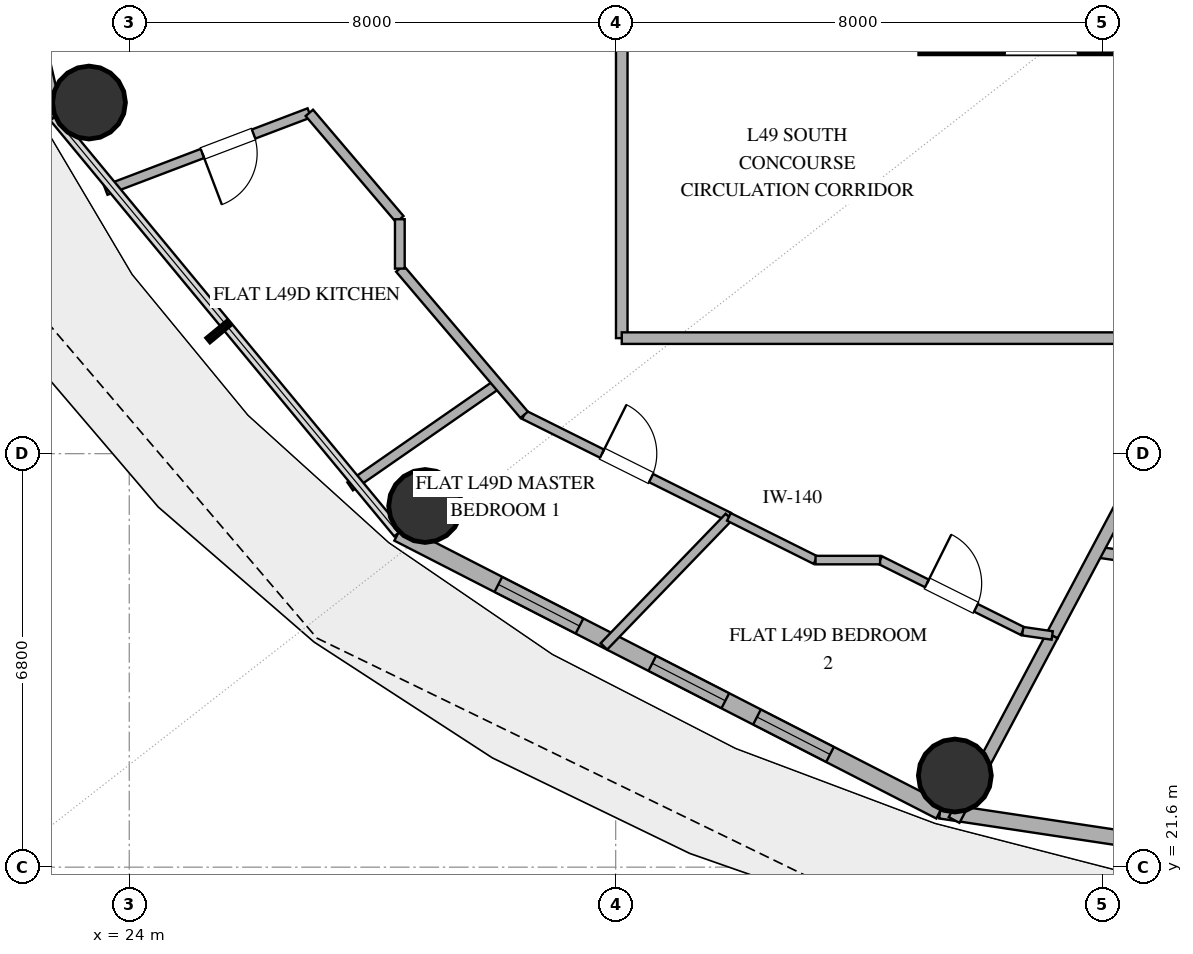
"""IFC4 building model, lengths in metres.
Left out: names, types, materials, properties, quantities, classifications, styles, units other than length and angle.
Written with IfcOpenShell. Run it as: python <this file> out.ifc"""

import sys

from ifc_helpers import new_model, si_unit, direction, frame, frame_2d, origin, origin_2d, place, context, subcontext, project, spatial, rectangle, hollow_circle, extrude, element, fill, save


model = new_model("IFC4")
c1 = context("Model", 3, precision=1e-05, world=origin(), true_north=direction((0.0, 1.0)))
c2 = subcontext(c1, "Body", "Model", "MODEL_VIEW")
j1 = project(units=[si_unit("LENGTHUNIT", "METRE"), si_unit("PLANEANGLEUNIT", "RADIAN")], contexts=[c1])
p1 = place(None, origin())
s1 = spatial("IfcSite", under=j1, at=p1, CompositionType="ELEMENT")
p2 = place(p1, origin())
s2 = spatial("IfcBuilding", under=s1, at=p2, CompositionType="ELEMENT")
p3 = place(p2, frame((0.0, 0.0, 193.8)))
s3 = spatial("IfcBuildingStorey", under=s2, at=p3, CompositionType="ELEMENT", Elevation=193.8)
p4 = place(p3, frame((37.0, 35.2, 0.0), z_axis=(0.0, 0.0, 1.0), x_axis=(1.0, 0.0, 0.0)))
e1 = element("IfcWall", 1, at=p4, inside=s3, PredefinedType="SHEAR", context=c2, shape_type="SweptSolid", body=[
    extrude(rectangle(XDim=4.0, YDim=0.45, at=frame_2d((2.0, 0.0))), origin(), (0.0, 0.0, 1.0), 3.38),
])
p5 = place(p4, frame((1.4, 0.0, 0.0)))
e2 = element("IfcOpeningElement", 2, at=p5, cuts=e1, PredefinedType="OPENING", context=c2, shape_type="SweptSolid", body=[
    extrude(rectangle(XDim=1.2, YDim=2.15, at=frame_2d((0.6, 1.075))), frame((0.0, 0.235, 0.0), z_axis=(0.0, -1.0, 0.0), x_axis=(1.0, 0.0, 0.0)), (0.0, 0.0, 1.0), 0.47),
])
for number, where, z_axis, x_axis in (
    (3, (23.338, 34.174, 0.0), (0.0, 0.0, 1.0), (1.0, 0.0, 0.0)),
    (4, (28.866, 27.54, 0.0), (0.0, 0.0, 1.0), (1.0, 0.0, 0.0)),
    (5, (37.578, 23.107, 0.0), (0.0, 0.0, 1.0), (1.0, 0.0, 0.0)),
):
    element("IfcColumn", number, at=place(p3, frame(where, z_axis=z_axis, x_axis=x_axis)), inside=s3, PredefinedType="COLUMN", context=c2, shape_type="SweptSolid", body=[
        extrude(hollow_circle(Radius=0.6, WallThickness=0.032, at=origin_2d()), origin(), (0.0, 0.0, 1.0), 3.38),
    ])
p6 = place(p3, frame((20.901, 42.0, 0.0), z_axis=(0.0, 0.0, 1.0), x_axis=(0.225473184558, -0.974249374157, 0.0)))
e6 = element("IfcWall", 6, at=p6, inside=s3, PredefinedType="SOLIDWALL", context=c2, shape_type="SweptSolid", body=[
    extrude(rectangle(XDim=8.28, YDim=0.28, at=frame_2d((4.14, 0.0))), origin(), (0.0, 0.0, 1.0), 3.38),
])
p7 = place(p6, frame((5.694, 0.0, 0.0)))
e7 = element("IfcOpeningElement", 7, at=p7, cuts=e6, PredefinedType="OPENING", context=c2, shape_type="SweptSolid", body=[
    extrude(rectangle(XDim=1.05, YDim=2.2, at=frame_2d((0.525, 1.1))), frame((0.0, 0.15, 0.0), z_axis=(0.0, -1.0, 0.0), x_axis=(1.0, 0.0, 0.0)), (0.0, 0.0, 1.0), 0.3),
])
p8 = place(p3, frame((28.424, 27.094, 0.0), z_axis=(0.0, 0.0, 1.0), x_axis=(0.889872523182, -0.456209263919, 0.0)))
e8 = element("IfcWall", 8, at=p8, inside=s3, PredefinedType="SOLIDWALL", context=c2, shape_type="SweptSolid", body=[
    extrude(rectangle(XDim=10.016, YDim=0.28, at=frame_2d((5.008, 0.0))), origin(), (0.0, 0.0, 1.0), 3.38),
])
p9 = place(p8, frame((1.85, 0.0, 0.85)))
e9 = element("IfcOpeningElement", 9, at=p9, cuts=e8, PredefinedType="OPENING", context=c2, shape_type="SweptSolid", body=[
    extrude(rectangle(XDim=1.5, YDim=1.8, at=frame_2d((0.75, 0.9))), frame((0.0, 0.15, 0.0), z_axis=(0.0, -1.0, 0.0), x_axis=(1.0, 0.0, 0.0)), (0.0, 0.0, 1.0), 0.3),
])
p10 = place(p8, frame((4.695, 0.0, 0.85)))
e10 = element("IfcOpeningElement", 10, at=p10, cuts=e8, PredefinedType="OPENING", context=c2, shape_type="SweptSolid", body=[
    extrude(rectangle(XDim=1.35, YDim=1.8, at=frame_2d((0.675, 0.9))), frame((0.0, 0.15, 0.0), z_axis=(0.0, -1.0, 0.0), x_axis=(1.0, 0.0, 0.0)), (0.0, 0.0, 1.0), 0.3),
])
p11 = place(p8, frame((6.63, 0.0, 0.85)))
e11 = element("IfcOpeningElement", 11, at=p11, cuts=e8, PredefinedType="OPENING", context=c2, shape_type="SweptSolid", body=[
    extrude(rectangle(XDim=1.35, YDim=1.8, at=frame_2d((0.675, 0.9))), frame((0.0, 0.15, 0.0), z_axis=(0.0, -1.0, 0.0), x_axis=(1.0, 0.0, 0.0)), (0.0, 0.0, 1.0), 0.3),
])
p12 = place(p3, frame((37.337, 22.525, 0.0), z_axis=(0.0, 0.0, 1.0), x_axis=(0.988863993413, -0.148822049884, 0.0)))
e12 = element("IfcWall", 12, at=p12, inside=s3, PredefinedType="SOLIDWALL", context=c2, shape_type="SweptSolid", body=[
    extrude(rectangle(XDim=10.783, YDim=0.25, at=frame_2d((5.392, 0.0))), origin(), (0.0, 0.0, 1.0), 3.38),
])
p13 = place(p12, frame((3.482, 0.0, 0.35)))
e13 = element("IfcOpeningElement", 13, at=p13, cuts=e12, PredefinedType="OPENING", context=c2, shape_type="SweptSolid", body=[
    extrude(rectangle(XDim=1.0, YDim=1.05, at=frame_2d((0.5, 0.525))), frame((0.0, 0.135, 0.0), z_axis=(0.0, -1.0, 0.0), x_axis=(1.0, 0.0, 0.0)), (0.0, 0.0, 1.0), 0.27),
])
p14 = place(p3, frame((32.1, 30.3, 0.0), z_axis=(0.0, 0.0, 1.0), x_axis=(0.0, 1.0, 0.0)))
e14 = element("IfcWall", 14, at=p14, inside=s3, PredefinedType="PARTITIONING", context=c2, shape_type="SweptSolid", body=[
    extrude(rectangle(XDim=12.287, YDim=0.19, at=frame_2d((6.144, 0.0))), origin(), (0.0, 0.0, 1.0), 2.74),
])
p15 = place(p14, frame((5.601, 0.0, 0.0)))
e15 = element("IfcOpeningElement", 15, at=p15, cuts=e14, PredefinedType="OPENING", context=c2, shape_type="SweptSolid", body=[
    extrude(rectangle(XDim=1.0, YDim=2.2, at=frame_2d((0.5, 1.1))), frame((0.0, 0.105, 0.0), z_axis=(0.0, -1.0, 0.0), x_axis=(1.0, 0.0, 0.0)), (0.0, 0.0, 1.0), 0.21),
])
p16 = place(p3, frame((41.815, 30.3, 0.0), z_axis=(0.0, 0.0, 1.0), x_axis=(-1.0, 0.0, 0.0)))
e16 = element("IfcWall", 16, at=p16, inside=s3, PredefinedType="PARTITIONING", context=c2, shape_type="SweptSolid", body=[
    extrude(rectangle(XDim=9.715, YDim=0.19, at=frame_2d((4.857, 0.0))), origin(), (0.0, 0.0, 1.0), 2.74),
])
p17 = place(p3, frame((39.909, 26.783, 0.0), z_axis=(0.0, 0.0, 1.0), x_axis=(0.989831677838, -0.142243627443, 0.0)))
e17 = element("IfcWall", 17, at=p17, inside=s3, PredefinedType="PLUMBINGWALL", context=c2, shape_type="SweptSolid", body=[
    extrude(rectangle(XDim=4.406, YDim=0.18, at=frame_2d((2.203, 0.0))), origin(), (0.0, 0.0, 1.0), 2.74),
])
p18 = place(p17, frame((1.778, 0.0, 0.0)))
e18 = element("IfcOpeningElement", 18, at=p18, cuts=e17, PredefinedType="OPENING", context=c2, shape_type="SweptSolid", body=[
    extrude(rectangle(XDim=0.85, YDim=2.1, at=frame_2d((0.425, 1.05))), frame((0.0, 0.1, 0.0), z_axis=(0.0, -1.0, 0.0), x_axis=(1.0, 0.0, 0.0)), (0.0, 0.0, 1.0), 0.2),
])
p19 = place(p3, frame((39.179, 25.41, 0.0), z_axis=(0.0, 0.0, 1.0), x_axis=(0.469450659963, 0.88295870677, 0.0)))
e19 = element("IfcWall", 19, at=p19, inside=s3, PredefinedType="PARTITIONING", context=c2, shape_type="SweptSolid", body=[
    extrude(rectangle(XDim=5.538, YDim=0.2, at=frame_2d((2.769, 0.0))), origin(), (0.0, 0.0, 1.0), 2.74),
])
p20 = place(p3, frame((30.495, 29.039, 0.0), z_axis=(0.0, 0.0, 1.0), x_axis=(0.894945698469, -0.44617507415, 0.0)))
e20 = element("IfcWall", 20, at=p20, inside=s3, PredefinedType="PARTITIONING", context=c2, shape_type="SweptSolid", body=[
    extrude(rectangle(XDim=3.762, YDim=0.15, at=frame_2d((1.881, 0.0))), origin(), (0.0, 0.0, 1.0), 2.74),
])
p21 = place(p20, frame((1.431, 0.0, 0.0)))
e21 = element("IfcOpeningElement", 21, at=p21, cuts=e20, PredefinedType="OPENING", context=c2, shape_type="SweptSolid", body=[
    extrude(rectangle(XDim=0.9, YDim=2.1, at=frame_2d((0.45, 1.05))), frame((0.0, 0.085, 0.0), z_axis=(0.0, -1.0, 0.0), x_axis=(1.0, 0.0, 0.0)), (0.0, 0.0, 1.0), 0.17),
])
p22 = place(p3, frame((26.962, 34.005, 0.0), z_axis=(0.0, 0.0, 1.0), x_axis=(-0.934799422257, -0.355176069222, 0.0)))
e22 = element("IfcWall", 22, at=p22, inside=s3, PredefinedType="PLUMBINGWALL", context=c2, shape_type="SweptSolid", body=[
    extrude(rectangle(XDim=3.582, YDim=0.16, at=frame_2d((1.791, 0.0))), origin(), (0.0, 0.0, 1.0), 2.74),
])
p23 = place(p22, frame((0.981, 0.0, 0.0)))
e23 = element("IfcOpeningElement", 23, at=p23, cuts=e22, PredefinedType="OPENING", context=c2, shape_type="SweptSolid", body=[
    extrude(rectangle(XDim=0.9, YDim=2.1, at=frame_2d((0.45, 1.05))), frame((0.0, 0.09, 0.0), z_axis=(0.0, -1.0, 0.0), x_axis=(1.0, 0.0, 0.0)), (0.0, 0.0, 1.0), 0.18),
])
p24 = place(p3, frame((39.179, 25.41, 0.0), z_axis=(0.0, 0.0, 1.0), x_axis=(-0.469492799927, -0.882936300543, 0.0)))
e24 = element("IfcWall", 24, at=p24, inside=s3, PredefinedType="PARTITIONING", context=c2, shape_type="SweptSolid", body=[
    extrude(rectangle(XDim=3.437, YDim=0.2, at=frame_2d((1.718, 0.0))), origin(), (0.0, 0.0, 1.0), 2.74),
])
p25 = place(p3, frame((33.862, 27.36, 0.0), z_axis=(0.0, 0.0, 1.0), x_axis=(-0.694625426755, -0.719371612246, 0.0)))
e25 = element("IfcWall", 25, at=p25, inside=s3, PredefinedType="PARTITIONING", context=c2, shape_type="SweptSolid", body=[
    extrude(rectangle(XDim=2.96, YDim=0.15, at=frame_2d((1.48, 0.0))), origin(), (0.0, 0.0, 1.0), 2.74),
])
p26 = place(p3, frame((30.062, 29.548, 0.0), z_axis=(0.0, 0.0, 1.0), x_axis=(-0.821498907673, -0.570210088207, 0.0)))
e26 = element("IfcWall", 26, at=p26, inside=s3, PredefinedType="PLUMBINGWALL", context=c2, shape_type="SweptSolid", body=[
    extrude(rectangle(XDim=2.957, YDim=0.16, at=frame_2d((1.478, 0.0))), origin(), (0.0, 0.0, 1.0), 2.74),
])
p27 = place(p3, frame((36.349, 26.65, 0.0), z_axis=(0.0, 0.0, 1.0), x_axis=(0.895041110332, -0.445983644112, 0.0)))
e27 = element("IfcWall", 27, at=p27, inside=s3, PredefinedType="PARTITIONING", context=c2, shape_type="SweptSolid", body=[
    extrude(rectangle(XDim=2.621, YDim=0.14, at=frame_2d((1.311, 0.0))), origin(), (0.0, 0.0, 1.0), 2.74),
])
p28 = place(p27, frame((0.861, 0.0, 0.0)))
e28 = element("IfcOpeningElement", 28, at=p28, cuts=e27, PredefinedType="OPENING", context=c2, shape_type="SweptSolid", body=[
    extrude(rectangle(XDim=0.9, YDim=2.1, at=frame_2d((0.45, 1.05))), frame((0.0, 0.08, 0.0), z_axis=(0.0, -1.0, 0.0), x_axis=(1.0, 0.0, 0.0)), (0.0, 0.0, 1.0), 0.16),
])
p29 = place(p3, frame((30.495, 29.039, 0.0), z_axis=(0.0, 0.0, 1.0), x_axis=(-0.647888606369, 0.761735094201, 0.0)))
e29 = element("IfcWall", 29, at=p29, inside=s3, PredefinedType="PLUMBINGWALL", context=c2, shape_type="SweptSolid", body=[
    extrude(rectangle(XDim=3.157, YDim=0.16, at=frame_2d((1.578, 0.0))), origin(), (0.0, 0.0, 1.0), 2.74),
])
p30 = place(p3, frame((28.45, 32.256, 0.0), z_axis=(0.0, 0.0, 1.0), x_axis=(-0.648055662854, 0.761592973866, 0.0)))
e30 = element("IfcWall", 30, at=p30, inside=s3, PredefinedType="PLUMBINGWALL", context=c2, shape_type="SweptSolid", body=[
    extrude(rectangle(XDim=2.297, YDim=0.16, at=frame_2d((1.148, 0.0))), origin(), (0.0, 0.0, 1.0), 2.74),
])
p31 = place(p3, frame((33.862, 27.36, 0.0), z_axis=(0.0, 0.0, 1.0), x_axis=(0.894917522296, -0.446231585937, 0.0)))
e31 = element("IfcWall", 31, at=p31, inside=s3, PredefinedType="PARTITIONING", context=c2, shape_type="SweptSolid", body=[
    extrude(rectangle(XDim=1.592, YDim=0.14, at=frame_2d((0.796, 0.0))), origin(), (0.0, 0.0, 1.0), 2.74),
])
p32 = place(p3, frame((35.287, 26.65, 0.0), z_axis=(0.0, 0.0, 1.0), x_axis=(1.0, 0.0, 0.0)))
e32 = element("IfcWall", 32, at=p32, inside=s3, PredefinedType="PARTITIONING", context=c2, shape_type="SweptSolid", body=[
    extrude(rectangle(XDim=1.062, YDim=0.14, at=frame_2d((0.531, 0.0))), origin(), (0.0, 0.0, 1.0), 2.74),
])
p33 = place(p3, frame((28.45, 31.443, 0.0), z_axis=(0.0, 0.0, 1.0), x_axis=(0.0, 1.0, 0.0)))
e33 = element("IfcWall", 33, at=p33, inside=s3, PredefinedType="PLUMBINGWALL", context=c2, shape_type="SweptSolid", body=[
    extrude(rectangle(XDim=0.812, YDim=0.16, at=frame_2d((0.406, 0.0))), origin(), (0.0, 0.0, 1.0), 2.74),
])
p34 = place(p3, frame((38.695, 25.481, 0.0), z_axis=(0.0, 0.0, 1.0), x_axis=(0.989485449351, -0.144632449754, 0.0)))
e34 = element("IfcWall", 34, at=p34, inside=s3, PredefinedType="PARTITIONING", context=c2, shape_type="SweptSolid", body=[
    extrude(rectangle(XDim=0.49, YDim=0.14, at=frame_2d((0.245, 0.0))), origin(), (0.0, 0.0, 1.0), 2.74),
])
p35 = place(p9, origin())
e35 = element("IfcWindow", 35, at=p35, inside=s3, PartitioningType="SINGLE_PANEL", PredefinedType="WINDOW", context=c2, shape_type="SweptSolid", body=[
    extrude(rectangle(XDim=1.5, YDim=1.8, at=frame_2d((0.75, 0.9))), frame((0.0, 0.03, 0.0), z_axis=(0.0, -1.0, 0.0), x_axis=(1.0, 0.0, 0.0)), (0.0, 0.0, 1.0), 0.06),
])
fill(e9, e35)
p36 = place(p10, origin())
e36 = element("IfcWindow", 36, at=p36, inside=s3, PartitioningType="SINGLE_PANEL", PredefinedType="WINDOW", context=c2, shape_type="SweptSolid", body=[
    extrude(rectangle(XDim=1.35, YDim=1.8, at=frame_2d((0.675, 0.9))), frame((0.0, 0.03, 0.0), z_axis=(0.0, -1.0, 0.0), x_axis=(1.0, 0.0, 0.0)), (0.0, 0.0, 1.0), 0.06),
])
fill(e10, e36)
p37 = place(p11, origin())
e37 = element("IfcWindow", 37, at=p37, inside=s3, PartitioningType="SINGLE_PANEL", PredefinedType="WINDOW", context=c2, shape_type="SweptSolid", body=[
    extrude(rectangle(XDim=1.35, YDim=1.8, at=frame_2d((0.675, 0.9))), frame((0.0, 0.03, 0.0), z_axis=(0.0, -1.0, 0.0), x_axis=(1.0, 0.0, 0.0)), (0.0, 0.0, 1.0), 0.06),
])
fill(e11, e37)
p38 = place(p21, origin())
e38 = element("IfcDoor", 38, at=p38, inside=s3, OperationType="SINGLE_SWING_LEFT", PredefinedType="DOOR", context=c2, shape_type="SweptSolid", body=[
    extrude(rectangle(XDim=0.9, YDim=2.1, at=frame_2d((0.45, 1.05))), frame((0.0, 0.025, 0.0), z_axis=(0.0, -1.0, 0.0), x_axis=(1.0, 0.0, 0.0)), (0.0, 0.0, 1.0), 0.05),
])
fill(e21, e38)
p39 = place(p23, origin())
e39 = element("IfcDoor", 39, at=p39, inside=s3, OperationType="SINGLE_SWING_RIGHT", PredefinedType="DOOR", context=c2, shape_type="SweptSolid", body=[
    extrude(rectangle(XDim=0.9, YDim=2.1, at=frame_2d((0.45, 1.05))), frame((0.0, 0.025, 0.0), z_axis=(0.0, -1.0, 0.0), x_axis=(1.0, 0.0, 0.0)), (0.0, 0.0, 1.0), 0.05),
])
fill(e23, e39)
p40 = place(p28, origin())
e40 = element("IfcDoor", 40, at=p40, inside=s3, OperationType="SINGLE_SWING_LEFT", PredefinedType="DOOR", context=c2, shape_type="SweptSolid", body=[
    extrude(rectangle(XDim=0.9, YDim=2.1, at=frame_2d((0.45, 1.05))), frame((0.0, 0.025, 0.0), z_axis=(0.0, -1.0, 0.0), x_axis=(1.0, 0.0, 0.0)), (0.0, 0.0, 1.0), 0.05),
])
fill(e28, e40)
save(model, sys.argv[1])
